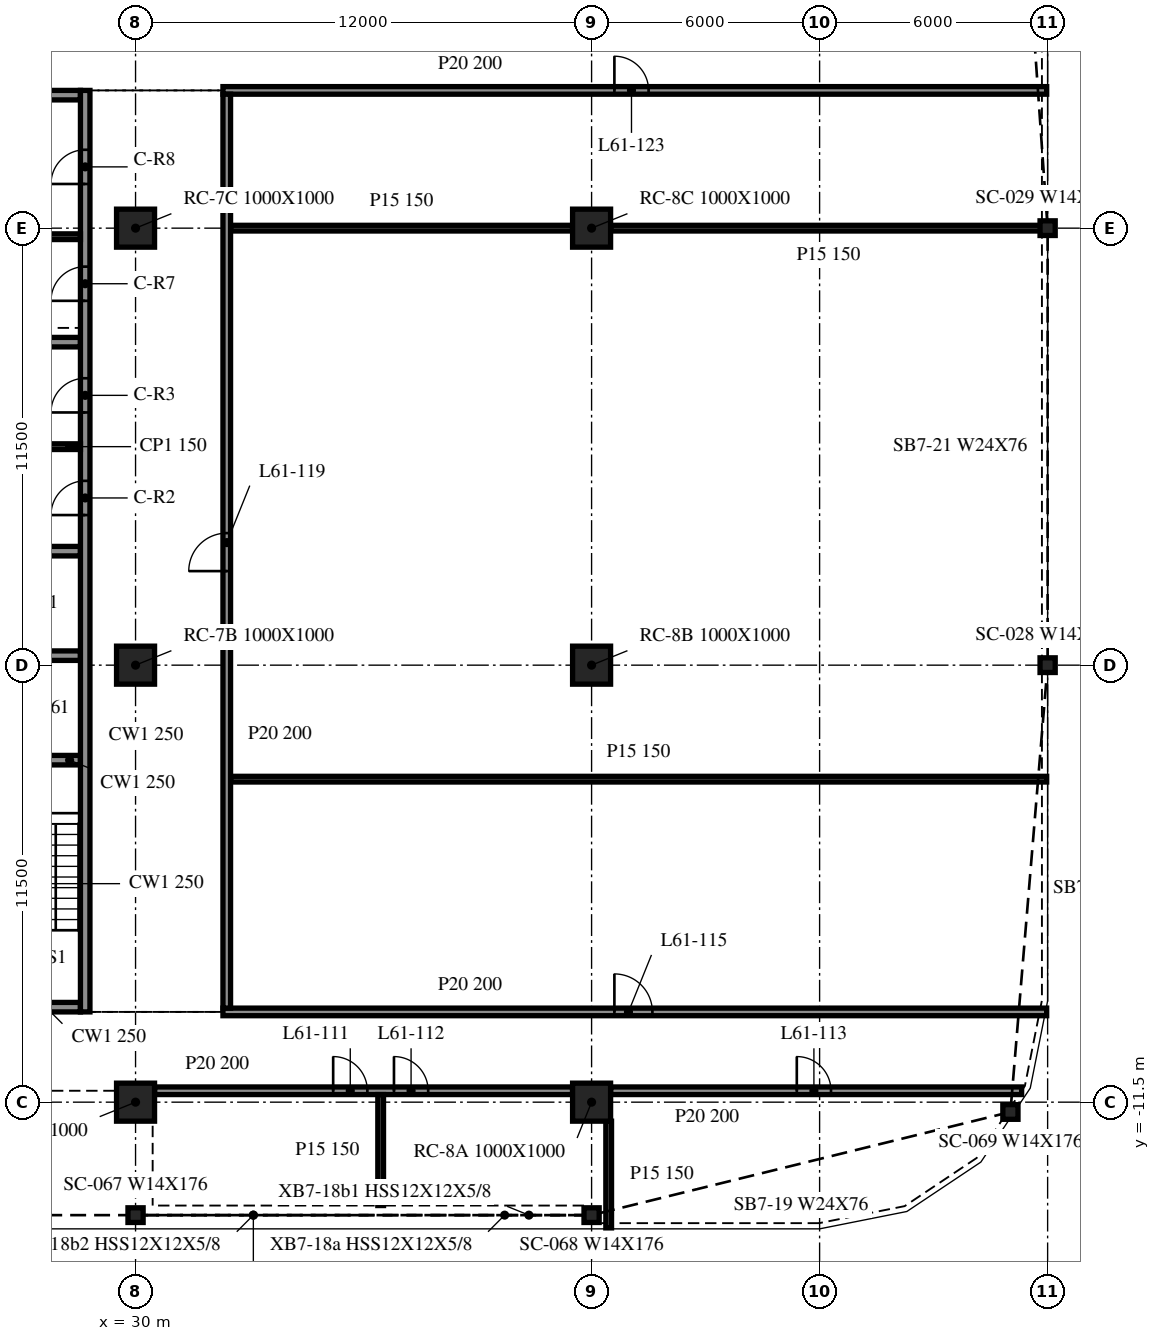
"""IFC4 building model, lengths in metres.
Left out: names, types, materials, properties, quantities, classifications, styles, units other than length and angle.
Written with IfcOpenShell. Run it as: python <this file> out.ifc"""

import sys

from ifc_helpers import new_model, si_unit, direction, frame, frame_2d, origin, origin_2d, place, context, subcontext, project, spatial, rectangle, i_section, extrude, element, fill, save


model = new_model("IFC4")
c1 = context("Model", 3, precision=1e-05, world=origin(), true_north=direction((0.0, 1.0)))
c2 = subcontext(c1, "Body", "Model", "MODEL_VIEW")
j1 = project(units=[si_unit("LENGTHUNIT", "METRE"), si_unit("PLANEANGLEUNIT", "RADIAN")], contexts=[c1])
p1 = place(None, origin())
s1 = spatial("IfcSite", under=j1, at=p1, CompositionType="ELEMENT")
p2 = place(p1, origin())
s2 = spatial("IfcBuilding", under=s1, at=p2, CompositionType="ELEMENT")
p3 = place(p2, frame((0.0, 0.0, 251.4)))
s3 = spatial("IfcBuildingStorey", under=s2, at=p3, CompositionType="ELEMENT", Elevation=251.4)
for number, where, z_axis, x_axis in (
    (1, (30.0, -11.5, -0.34), (0.0, 0.0, 1.0), (1.0, 0.0, 0.0)),
    (2, (30.0, 0.0, -0.34), (0.0, 0.0, 1.0), (1.0, 0.0, 0.0)),
    (3, (30.0, 11.5, -0.34), (0.0, 0.0, 1.0), (1.0, 0.0, 0.0)),
    (4, (42.0, -11.5, -0.34), (0.0, 0.0, 1.0), (1.0, 0.0, 0.0)),
    (5, (42.0, 0.0, -0.34), (0.0, 0.0, 1.0), (1.0, 0.0, 0.0)),
    (6, (42.0, 11.5, -0.34), (0.0, 0.0, 1.0), (1.0, 0.0, 0.0)),
):
    element("IfcColumn", number, at=place(p3, frame(where, z_axis=z_axis, x_axis=x_axis)), inside=s3, PredefinedType="COLUMN", context=c2, shape_type="SweptSolid", body=[
        extrude(rectangle(XDim=1.0, YDim=1.0, at=origin_2d()), origin(), (0.0, 0.0, 1.0), 3.8),
    ])
for number, where, z_axis, x_axis in (
    (7, (30.0, -14.473, -0.34), (0.0, 0.0, 1.0), (1.0, 0.0, 0.0)),
    (8, (42.0, -14.473, -0.34), (0.0, 0.0, 1.0), (1.0, 0.0, 0.0)),
    (9, (53.021, -11.758, -0.34), (0.0, 0.0, 1.0), (1.0, 0.0, 0.0)),
    (10, (54.0, 0.0, -0.34), (0.0, 0.0, 1.0), (1.0, 0.0, 0.0)),
    (11, (54.0, 11.5, -0.34), (0.0, 0.0, 1.0), (1.0, 0.0, 0.0)),
):
    element("IfcColumn", number, at=place(p3, frame(where, z_axis=z_axis, x_axis=x_axis)), inside=s3, PredefinedType="COLUMN", context=c2, shape_type="SweptSolid", body=[
        extrude(i_section(OverallWidth=0.399, OverallDepth=0.386, WebThickness=0.021, FlangeThickness=0.033, at=origin_2d()), origin(), (0.0, 0.0, 1.0), 3.8),
    ])
p4 = place(p3, frame((28.675, -9.125, 0.0), z_axis=(0.0, 0.0, 1.0), x_axis=(0.0, 1.0, 0.0)))
e12 = element("IfcWall", 12, at=p4, inside=s3, PredefinedType="SOLIDWALL", context=c2, shape_type="SweptSolid", body=[
    extrude(rectangle(XDim=24.25, YDim=0.25, at=frame_2d((12.125, 0.0))), origin(), (0.0, 0.0, 1.0), 3.46),
])
p5 = place(p4, frame((13.075, 0.0, 0.0)))
e13 = element("IfcOpeningElement", 13, at=p5, cuts=e12, PredefinedType="OPENING", context=c2, shape_type="SweptSolid", body=[
    extrude(rectangle(XDim=0.9, YDim=2.1, at=frame_2d((0.45, 1.05))), frame((0.0, 0.135, 0.0), z_axis=(0.0, -1.0, 0.0), x_axis=(1.0, 0.0, 0.0)), (0.0, 0.0, 1.0), 0.27),
])
p6 = place(p4, frame((15.775, 0.0, 0.0)))
e14 = element("IfcOpeningElement", 14, at=p6, cuts=e12, PredefinedType="OPENING", context=c2, shape_type="SweptSolid", body=[
    extrude(rectangle(XDim=0.9, YDim=2.1, at=frame_2d((0.45, 1.05))), frame((0.0, 0.135, 0.0), z_axis=(0.0, -1.0, 0.0), x_axis=(1.0, 0.0, 0.0)), (0.0, 0.0, 1.0), 0.27),
])
p7 = place(p4, frame((18.712, 0.0, 0.0)))
e15 = element("IfcOpeningElement", 15, at=p7, cuts=e12, PredefinedType="OPENING", context=c2, shape_type="SweptSolid", body=[
    extrude(rectangle(XDim=0.9, YDim=2.1, at=frame_2d((0.45, 1.05))), frame((0.0, 0.135, 0.0), z_axis=(0.0, -1.0, 0.0), x_axis=(1.0, 0.0, 0.0)), (0.0, 0.0, 1.0), 0.27),
])
p8 = place(p4, frame((21.788, 0.0, 0.0)))
e16 = element("IfcOpeningElement", 16, at=p8, cuts=e12, PredefinedType="OPENING", context=c2, shape_type="SweptSolid", body=[
    extrude(rectangle(XDim=0.9, YDim=2.1, at=frame_2d((0.45, 1.05))), frame((0.0, 0.135, 0.0), z_axis=(0.0, -1.0, 0.0), x_axis=(1.0, 0.0, 0.0)), (0.0, 0.0, 1.0), 0.27),
])
p9 = place(p3, frame((28.55, -9.0, 0.0), z_axis=(0.0, 0.0, 1.0), x_axis=(-1.0, 0.0, 0.0)))
e17 = element("IfcWall", 17, at=p9, inside=s3, PredefinedType="SOLIDWALL", context=c2, shape_type="SweptSolid", body=[
    extrude(rectangle(XDim=9.1, YDim=0.25, at=frame_2d((4.55, 0.0))), origin(), (0.0, 0.0, 1.0), 3.46),
])
p10 = place(p9, frame((3.65, 0.0, 0.0)))
e18 = element("IfcOpeningElement", 18, at=p10, cuts=e17, PredefinedType="OPENING", context=c2, shape_type="SweptSolid", body=[
    extrude(rectangle(XDim=1.8, YDim=2.1, at=frame_2d((0.9, 1.05))), frame((0.0, 0.135, 0.0), z_axis=(0.0, -1.0, 0.0), x_axis=(1.0, 0.0, 0.0)), (0.0, 0.0, 1.0), 0.27),
])
p11 = place(p3, frame((19.45, 15.0, 0.0), z_axis=(0.0, 0.0, 1.0), x_axis=(1.0, 0.0, 0.0)))
e19 = element("IfcWall", 19, at=p11, inside=s3, PredefinedType="SOLIDWALL", context=c2, shape_type="SweptSolid", body=[
    extrude(rectangle(XDim=9.1, YDim=0.25, at=frame_2d((4.55, 0.0))), origin(), (0.0, 0.0, 1.0), 3.46),
])
p12 = place(p11, frame((3.65, 0.0, 0.0)))
e20 = element("IfcOpeningElement", 20, at=p12, cuts=e19, PredefinedType="OPENING", context=c2, shape_type="SweptSolid", body=[
    extrude(rectangle(XDim=1.8, YDim=2.1, at=frame_2d((0.9, 1.05))), frame((0.0, 0.135, 0.0), z_axis=(0.0, -1.0, 0.0), x_axis=(1.0, 0.0, 0.0)), (0.0, 0.0, 1.0), 0.27),
])
for number, where, z_axis, x_axis in (
    (21, (25.7, -2.5, 0.0), (0.0, 0.0, 1.0), (1.0, 0.0, 0.0)),
    (22, (25.7, 0.25, 0.0), (0.0, 0.0, 1.0), (1.0, 0.0, 0.0)),
    (23, (25.7, 3.0, 0.0), (0.0, 0.0, 1.0), (1.0, 0.0, 0.0)),
    (24, (25.7, 8.5, 0.0), (0.0, 0.0, 1.0), (1.0, 0.0, 0.0)),
):
    element("IfcWall", number, at=place(p3, frame(where, z_axis=z_axis, x_axis=x_axis)), inside=s3, PredefinedType="SOLIDWALL", context=c2, shape_type="SweptSolid", body=[
        extrude(rectangle(XDim=2.85, YDim=0.25, at=frame_2d((1.425, 0.0))), origin(), (0.0, 0.0, 1.0), 3.46),
    ])
for number, where, z_axis, x_axis in (
    (25, (25.7, 5.75, 0.0), (0.0, 0.0, 1.0), (1.0, 0.0, 0.0)),
    (26, (25.7, 11.275, 0.0), (0.0, 0.0, 1.0), (1.0, 0.0, 0.0)),
):
    element("IfcWall", number, at=place(p3, frame(where, z_axis=z_axis, x_axis=x_axis)), inside=s3, PredefinedType="PARTITIONING", context=c2, shape_type="SweptSolid", body=[
        extrude(rectangle(XDim=2.85, YDim=0.15, at=frame_2d((1.425, 0.0))), origin(), (0.0, 0.0, 1.0), 3.46),
    ])
p13 = place(p3, frame((30.5, -11.2, 0.0), z_axis=(0.0, 0.0, 1.0), x_axis=(1.0, 0.0, 0.0)))
e27 = element("IfcWall", 27, at=p13, inside=s3, PredefinedType="PARTITIONING", context=c2, shape_type="SweptSolid", body=[
    extrude(rectangle(XDim=11.0, YDim=0.2, at=frame_2d((5.5, 0.0))), origin(), (0.0, 0.0, 1.0), 3.46),
])
p14 = place(p13, frame((4.7, 0.0, 0.0)))
e28 = element("IfcOpeningElement", 28, at=p14, cuts=e27, PredefinedType="OPENING", context=c2, shape_type="SweptSolid", body=[
    extrude(rectangle(XDim=0.9, YDim=2.1, at=frame_2d((0.45, 1.05))), frame((0.0, 0.11, 0.0), z_axis=(0.0, -1.0, 0.0), x_axis=(1.0, 0.0, 0.0)), (0.0, 0.0, 1.0), 0.22),
])
p15 = place(p13, frame((6.3, 0.0, 0.0)))
e29 = element("IfcOpeningElement", 29, at=p15, cuts=e27, PredefinedType="OPENING", context=c2, shape_type="SweptSolid", body=[
    extrude(rectangle(XDim=0.9, YDim=2.1, at=frame_2d((0.45, 1.05))), frame((0.0, 0.11, 0.0), z_axis=(0.0, -1.0, 0.0), x_axis=(1.0, 0.0, 0.0)), (0.0, 0.0, 1.0), 0.22),
])
p16 = place(p3, frame((42.5, -11.2, 0.0), z_axis=(0.0, 0.0, 1.0), x_axis=(1.0, 0.0, 0.0)))
e30 = element("IfcWall", 30, at=p16, inside=s3, PredefinedType="PARTITIONING", context=c2, shape_type="SweptSolid", body=[
    extrude(rectangle(XDim=10.816, YDim=0.2, at=frame_2d((5.408, 0.0))), origin(), (0.0, 0.0, 1.0), 3.46),
])
p17 = place(p16, frame((4.9, 0.0, 0.0)))
e31 = element("IfcOpeningElement", 31, at=p17, cuts=e30, PredefinedType="OPENING", context=c2, shape_type="SweptSolid", body=[
    extrude(rectangle(XDim=0.9, YDim=2.1, at=frame_2d((0.45, 1.05))), frame((0.0, 0.11, 0.0), z_axis=(0.0, -1.0, 0.0), x_axis=(1.0, 0.0, 0.0)), (0.0, 0.0, 1.0), 0.22),
])
p18 = place(p3, frame((32.3, -9.125, 0.0), z_axis=(0.0, 0.0, 1.0), x_axis=(1.0, 0.0, 0.0)))
e32 = element("IfcWall", 32, at=p18, inside=s3, PredefinedType="PARTITIONING", context=c2, shape_type="SweptSolid", body=[
    extrude(rectangle(XDim=21.675, YDim=0.2, at=frame_2d((10.837, 0.0))), origin(), (0.0, 0.0, 1.0), 3.46),
])
p19 = place(p18, frame((10.3, 0.0, 0.0)))
e33 = element("IfcOpeningElement", 33, at=p19, cuts=e32, PredefinedType="OPENING", context=c2, shape_type="SweptSolid", body=[
    extrude(rectangle(XDim=1.0, YDim=2.1, at=frame_2d((0.5, 1.05))), frame((0.0, 0.11, 0.0), z_axis=(0.0, -1.0, 0.0), x_axis=(1.0, 0.0, 0.0)), (0.0, 0.0, 1.0), 0.22),
])
p20 = place(p3, frame((32.5, -3.0, 0.0), z_axis=(0.0, 0.0, 1.0), x_axis=(1.0, 0.0, 0.0)))
e34 = element("IfcWall", 34, at=p20, inside=s3, PredefinedType="PARTITIONING", context=c2, shape_type="SweptSolid", body=[
    extrude(rectangle(XDim=21.475, YDim=0.15, at=frame_2d((10.738, 0.0))), origin(), (0.0, 0.0, 1.0), 3.46),
])
p21 = place(p3, frame((32.5, 11.5, 0.0), z_axis=(0.0, 0.0, 1.0), x_axis=(1.0, 0.0, 0.0)))
e35 = element("IfcWall", 35, at=p21, inside=s3, PredefinedType="PARTITIONING", context=c2, shape_type="SweptSolid", body=[
    extrude(rectangle(XDim=9.0, YDim=0.15, at=frame_2d((4.5, 0.0))), origin(), (0.0, 0.0, 1.0), 3.46),
])
p22 = place(p3, frame((42.5, 11.5, 0.0), z_axis=(0.0, 0.0, 1.0), x_axis=(1.0, 0.0, 0.0)))
e36 = element("IfcWall", 36, at=p22, inside=s3, PredefinedType="PARTITIONING", context=c2, shape_type="SweptSolid", body=[
    extrude(rectangle(XDim=11.475, YDim=0.15, at=frame_2d((5.738, 0.0))), origin(), (0.0, 0.0, 1.0), 3.46),
])
p23 = place(p3, frame((32.3, 15.125, 0.0), z_axis=(0.0, 0.0, 1.0), x_axis=(1.0, 0.0, 0.0)))
e37 = element("IfcWall", 37, at=p23, inside=s3, PredefinedType="PARTITIONING", context=c2, shape_type="SweptSolid", body=[
    extrude(rectangle(XDim=21.675, YDim=0.2, at=frame_2d((10.837, 0.0))), origin(), (0.0, 0.0, 1.0), 3.46),
])
p24 = place(p23, frame((10.3, 0.0, 0.0)))
e38 = element("IfcOpeningElement", 38, at=p24, cuts=e37, PredefinedType="OPENING", context=c2, shape_type="SweptSolid", body=[
    extrude(rectangle(XDim=0.9, YDim=2.1, at=frame_2d((0.45, 1.05))), frame((0.0, 0.11, 0.0), z_axis=(0.0, -1.0, 0.0), x_axis=(1.0, 0.0, 0.0)), (0.0, 0.0, 1.0), 0.22),
])
p25 = place(p3, frame((32.4, -9.025, 0.0), z_axis=(0.0, 0.0, 1.0), x_axis=(0.0, 1.0, 0.0)))
e39 = element("IfcWall", 39, at=p25, inside=s3, PredefinedType="PARTITIONING", context=c2, shape_type="SweptSolid", body=[
    extrude(rectangle(XDim=24.05, YDim=0.2, at=frame_2d((12.025, 0.0))), origin(), (0.0, 0.0, 1.0), 3.46),
])
p26 = place(p25, frame((11.5, 0.0, 0.0)))
e40 = element("IfcOpeningElement", 40, at=p26, cuts=e39, PredefinedType="OPENING", context=c2, shape_type="SweptSolid", body=[
    extrude(rectangle(XDim=1.0, YDim=2.1, at=frame_2d((0.5, 1.05))), frame((0.0, 0.11, 0.0), z_axis=(0.0, -1.0, 0.0), x_axis=(1.0, 0.0, 0.0)), (0.0, 0.0, 1.0), 0.22),
])
p27 = place(p3, frame((36.45, -14.221, 0.0), z_axis=(0.0, 0.0, 1.0), x_axis=(0.0, 1.0, 0.0)))
e41 = element("IfcWall", 41, at=p27, inside=s3, PredefinedType="PARTITIONING", context=c2, shape_type="SweptSolid", body=[
    extrude(rectangle(XDim=2.921, YDim=0.15, at=frame_2d((1.46, 0.0))), origin(), (0.0, 0.0, 1.0), 3.46),
])
p28 = place(p3, frame((42.45, -14.809, 0.0), z_axis=(0.0, 0.0, 1.0), x_axis=(0.0, 1.0, 0.0)))
e42 = element("IfcWall", 42, at=p28, inside=s3, PredefinedType="PARTITIONING", context=c2, shape_type="SweptSolid", body=[
    extrude(rectangle(XDim=2.809, YDim=0.15, at=frame_2d((1.405, 0.0))), origin(), (0.0, 0.0, 1.0), 3.46),
])
p29 = place(p5, origin())
e43 = element("IfcDoor", 43, at=p29, inside=s3, OperationType="SINGLE_SWING_RIGHT", PredefinedType="DOOR", context=c2, shape_type="SweptSolid", body=[
    extrude(rectangle(XDim=0.9, YDim=2.1, at=frame_2d((0.45, 1.05))), frame((0.0, 0.025, 0.0), z_axis=(0.0, -1.0, 0.0), x_axis=(1.0, 0.0, 0.0)), (0.0, 0.0, 1.0), 0.05),
])
fill(e13, e43)
p30 = place(p6, origin())
e44 = element("IfcDoor", 44, at=p30, inside=s3, OperationType="SINGLE_SWING_LEFT", PredefinedType="DOOR", context=c2, shape_type="SweptSolid", body=[
    extrude(rectangle(XDim=0.9, YDim=2.1, at=frame_2d((0.45, 1.05))), frame((0.0, 0.025, 0.0), z_axis=(0.0, -1.0, 0.0), x_axis=(1.0, 0.0, 0.0)), (0.0, 0.0, 1.0), 0.05),
])
fill(e14, e44)
p31 = place(p7, origin())
e45 = element("IfcDoor", 45, at=p31, inside=s3, OperationType="SINGLE_SWING_LEFT", PredefinedType="DOOR", context=c2, shape_type="SweptSolid", body=[
    extrude(rectangle(XDim=0.9, YDim=2.1, at=frame_2d((0.45, 1.05))), frame((0.0, 0.025, 0.0), z_axis=(0.0, -1.0, 0.0), x_axis=(1.0, 0.0, 0.0)), (0.0, 0.0, 1.0), 0.05),
])
fill(e15, e45)
p32 = place(p8, origin())
e46 = element("IfcDoor", 46, at=p32, inside=s3, OperationType="SINGLE_SWING_RIGHT", PredefinedType="DOOR", context=c2, shape_type="SweptSolid", body=[
    extrude(rectangle(XDim=0.9, YDim=2.1, at=frame_2d((0.45, 1.05))), frame((0.0, 0.025, 0.0), z_axis=(0.0, -1.0, 0.0), x_axis=(1.0, 0.0, 0.0)), (0.0, 0.0, 1.0), 0.05),
])
fill(e16, e46)
p33 = place(p14, origin())
e47 = element("IfcDoor", 47, at=p33, inside=s3, OperationType="SINGLE_SWING_RIGHT", PredefinedType="DOOR", context=c2, shape_type="SweptSolid", body=[
    extrude(rectangle(XDim=0.9, YDim=2.1, at=frame_2d((0.45, 1.05))), frame((0.0, 0.025, 0.0), z_axis=(0.0, -1.0, 0.0), x_axis=(1.0, 0.0, 0.0)), (0.0, 0.0, 1.0), 0.05),
])
fill(e28, e47)
p34 = place(p15, origin())
e48 = element("IfcDoor", 48, at=p34, inside=s3, OperationType="SINGLE_SWING_LEFT", PredefinedType="DOOR", context=c2, shape_type="SweptSolid", body=[
    extrude(rectangle(XDim=0.9, YDim=2.1, at=frame_2d((0.45, 1.05))), frame((0.0, 0.025, 0.0), z_axis=(0.0, -1.0, 0.0), x_axis=(1.0, 0.0, 0.0)), (0.0, 0.0, 1.0), 0.05),
])
fill(e29, e48)
p35 = place(p17, origin())
e49 = element("IfcDoor", 49, at=p35, inside=s3, OperationType="SINGLE_SWING_RIGHT", PredefinedType="DOOR", context=c2, shape_type="SweptSolid", body=[
    extrude(rectangle(XDim=0.9, YDim=2.1, at=frame_2d((0.45, 1.05))), frame((0.0, 0.025, 0.0), z_axis=(0.0, -1.0, 0.0), x_axis=(1.0, 0.0, 0.0)), (0.0, 0.0, 1.0), 0.05),
])
fill(e31, e49)
p36 = place(p19, origin())
e50 = element("IfcDoor", 50, at=p36, inside=s3, OperationType="SINGLE_SWING_RIGHT", PredefinedType="DOOR", context=c2, shape_type="SweptSolid", body=[
    extrude(rectangle(XDim=1.0, YDim=2.1, at=frame_2d((0.5, 1.05))), frame((0.0, 0.025, 0.0), z_axis=(0.0, -1.0, 0.0), x_axis=(1.0, 0.0, 0.0)), (0.0, 0.0, 1.0), 0.05),
])
fill(e33, e50)
p37 = place(p26, origin())
e51 = element("IfcDoor", 51, at=p37, inside=s3, OperationType="SINGLE_SWING_RIGHT", PredefinedType="DOOR", context=c2, shape_type="SweptSolid", body=[
    extrude(rectangle(XDim=1.0, YDim=2.1, at=frame_2d((0.5, 1.05))), frame((0.0, 0.025, 0.0), z_axis=(0.0, -1.0, 0.0), x_axis=(1.0, 0.0, 0.0)), (0.0, 0.0, 1.0), 0.05),
])
fill(e40, e51)
p38 = place(p24, origin())
e52 = element("IfcDoor", 52, at=p38, inside=s3, OperationType="SINGLE_SWING_RIGHT", PredefinedType="DOOR", context=c2, shape_type="SweptSolid", body=[
    extrude(rectangle(XDim=0.9, YDim=2.1, at=frame_2d((0.45, 1.05))), frame((0.0, 0.025, 0.0), z_axis=(0.0, -1.0, 0.0), x_axis=(1.0, 0.0, 0.0)), (0.0, 0.0, 1.0), 0.05),
])
fill(e38, e52)
save(model, sys.argv[1])
